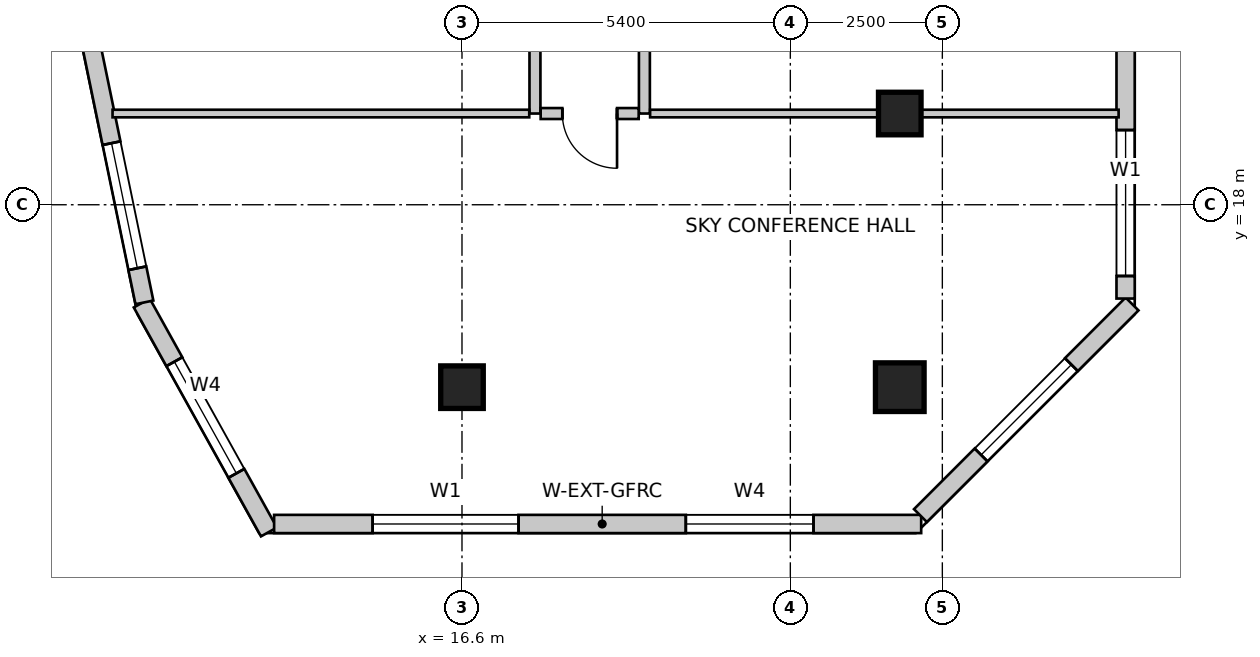
"""IFC4 building model, lengths in metres.
Left out: names, types, materials, properties, quantities, classifications, styles, units other than length and angle.
Written with IfcOpenShell. Run it as: python <this file> out.ifc"""

import sys

from ifc_helpers import new_model, si_unit, direction, frame, frame_2d, origin, origin_2d, place, context, subcontext, project, spatial, rectangle, extrude, source, transform, mapped, element, fill, save


model = new_model("IFC4")
c1 = context("Model", 3, precision=1e-05, world=origin(), true_north=direction((0.0, 1.0)))
c2 = subcontext(c1, "Body", "Model", "MODEL_VIEW")
j1 = project(units=[si_unit("LENGTHUNIT", "METRE"), si_unit("PLANEANGLEUNIT", "RADIAN")], contexts=[c1])
p1 = place(None, origin())
s1 = spatial("IfcSite", under=j1, at=p1, CompositionType="ELEMENT")
p2 = place(p1, origin())
s2 = spatial("IfcBuilding", under=s1, at=p2, CompositionType="ELEMENT")
p3 = place(p2, frame((0.0, 0.0, 235.9)))
s3 = spatial("IfcBuildingStorey", under=s2, at=p3, CompositionType="ELEMENT", Elevation=235.9)
m1 = source(origin(), c2, "Body", "SweptSolid", [
    extrude(rectangle(XDim=0.7, YDim=0.7, at=origin_2d()), origin(), (0.0, 0.0, 1.0), 3.5),
])
p4 = place(p3, frame((23.8, 19.5, 0.0), z_axis=(0.0, 0.0, 1.0), x_axis=(1.0, 0.0, 0.0)))
e1 = element("IfcColumn", 1, at=p4, inside=s3, PredefinedType="COLUMN", context=c2, shape_type="MappedRepresentation", body=[
    mapped(m1, transform((0.0, 0.0, 0.0), scale=1.0)),
])
m2 = source(origin(), c2, "Body", "SweptSolid", [
    extrude(rectangle(XDim=0.8, YDim=0.8, at=origin_2d()), origin(), (0.0, 0.0, 1.0), 3.5),
])
p5 = place(p3, frame((23.8, 15.0, 0.0), z_axis=(0.0, 0.0, 1.0), x_axis=(1.0, 0.0, 0.0)))
e2 = element("IfcColumn", 2, at=p5, inside=s3, PredefinedType="COLUMN", context=c2, shape_type="MappedRepresentation", body=[
    mapped(m2, transform((0.0, 0.0, 0.0), scale=1.0)),
])
p6 = place(p3, frame((16.6, 15.0, 0.0), z_axis=(0.0, 0.0, 1.0), x_axis=(1.0, 0.0, 0.0)))
e3 = element("IfcColumn", 3, at=p6, inside=s3, PredefinedType="COLUMN", context=c2, shape_type="MappedRepresentation", body=[
    mapped(m1, transform((0.0, 0.0, 0.0), scale=1.0)),
])
p7 = place(p3, frame((11.333, 16.384, 0.0), z_axis=(0.0, 0.0, 1.0), x_axis=(0.485633305139, -0.874162623852, 0.0)))
e4 = element("IfcWall", 4, at=p7, inside=s3, PredefinedType="SOLIDWALL", context=c2, shape_type="SweptSolid", body=[
    extrude(rectangle(XDim=4.307, YDim=0.3, at=frame_2d((2.153, 0.0))), origin(), (0.0, 0.0, 1.0), 3.25),
])
m3 = source(origin(), c2, "Body", "SweptSolid", [
    extrude(rectangle(XDim=2.1, YDim=2.0, at=frame_2d((1.05, 1.0))), frame((0.0, 0.16, 0.0), z_axis=(0.0, -1.0, 0.0), x_axis=(1.0, 0.0, 0.0)), (0.0, 0.0, 1.0), 0.32),
])
p8 = place(p7, frame((1.104, 0.0, 0.85)))
e5 = element("IfcOpeningElement", 5, at=p8, cuts=e4, PredefinedType="OPENING", context=c2, shape_type="MappedRepresentation", body=[
    mapped(m3, transform((0.0, 0.0, 0.0), scale=1.0)),
])
p9 = place(p3, frame((13.51, 12.75, 0.0), z_axis=(0.0, 0.0, 1.0), x_axis=(1.0, 0.0, 0.0)))
e6 = element("IfcWall", 6, at=p9, inside=s3, PredefinedType="SOLIDWALL", context=c2, shape_type="SweptSolid", body=[
    extrude(rectangle(XDim=10.642, YDim=0.3, at=frame_2d((5.321, 0.0))), origin(), (0.0, 0.0, 1.0), 3.25),
])
m4 = source(origin(), c2, "Body", "SweptSolid", [
    extrude(rectangle(XDim=2.4, YDim=2.2, at=frame_2d((1.2, 1.1))), frame((0.0, 0.16, 0.0), z_axis=(0.0, -1.0, 0.0), x_axis=(1.0, 0.0, 0.0)), (0.0, 0.0, 1.0), 0.32),
])
p10 = place(p9, frame((1.62, 0.0, 0.85)))
e7 = element("IfcOpeningElement", 7, at=p10, cuts=e6, PredefinedType="OPENING", context=c2, shape_type="MappedRepresentation", body=[
    mapped(m4, transform((0.0, 0.0, 0.0), scale=1.0)),
])
p11 = place(p9, frame((6.771, 0.0, 0.85)))
e8 = element("IfcOpeningElement", 8, at=p11, cuts=e6, PredefinedType="OPENING", context=c2, shape_type="MappedRepresentation", body=[
    mapped(m3, transform((0.0, 0.0, 0.0), scale=1.0)),
])
p12 = place(p3, frame((24.14, 12.888, 0.0), z_axis=(0.0, 0.0, 1.0), x_axis=(0.707106781187, 0.707106781187, 0.0)))
e9 = element("IfcWall", 9, at=p12, inside=s3, PredefinedType="SOLIDWALL", context=c2, shape_type="SweptSolid", body=[
    extrude(rectangle(XDim=4.922, YDim=0.3, at=frame_2d((2.461, 0.0))), origin(), (0.0, 0.0, 1.0), 3.25),
])
p13 = place(p12, frame((1.411, 0.0, 0.85)))
e10 = element("IfcOpeningElement", 10, at=p13, cuts=e9, PredefinedType="OPENING", context=c2, shape_type="MappedRepresentation", body=[
    mapped(m3, transform((0.0, 0.0, 0.0), scale=1.0)),
])
p14 = place(p3, frame((27.514, 16.457, 0.0), z_axis=(0.0, 0.0, 1.0), x_axis=(0.0, 1.0, 0.0)))
e11 = element("IfcWall", 11, at=p14, inside=s3, PredefinedType="SOLIDWALL", context=c2, shape_type="SweptSolid", body=[
    extrude(rectangle(XDim=14.447, YDim=0.3, at=frame_2d((7.223, 0.0))), origin(), (0.0, 0.0, 1.0), 3.25),
])
m5 = source(origin(), c2, "Body", "SweptSolid", [
    extrude(rectangle(XDim=1.6, YDim=2.15, at=frame_2d((0.8, 1.075))), frame((0.0, 0.16, 0.0), z_axis=(0.0, -1.0, 0.0), x_axis=(1.0, 0.0, 0.0)), (0.0, 0.0, 1.0), 0.32),
])
p15 = place(p14, frame((8.993, 0.0, 0.0)))
e12 = element("IfcOpeningElement", 12, at=p15, cuts=e11, PredefinedType="OPENING", context=c2, shape_type="MappedRepresentation", body=[
    mapped(m5, transform((0.0, 0.0, 0.0), scale=1.0)),
])
p16 = place(p14, frame((0.371, 0.0, 0.85)))
e13 = element("IfcOpeningElement", 13, at=p16, cuts=e11, PredefinedType="OPENING", context=c2, shape_type="MappedRepresentation", body=[
    mapped(m4, transform((0.0, 0.0, 0.0), scale=1.0)),
])
p17 = place(p14, frame((4.093, 0.0, 0.85)))
e14 = element("IfcOpeningElement", 14, at=p17, cuts=e11, PredefinedType="OPENING", context=c2, shape_type="MappedRepresentation", body=[
    mapped(m4, transform((0.0, 0.0, 0.0), scale=1.0)),
])
p18 = place(p14, frame((11.3, 0.0, 0.85)))
e15 = element("IfcOpeningElement", 15, at=p18, cuts=e11, PredefinedType="OPENING", context=c2, shape_type="MappedRepresentation", body=[
    mapped(m4, transform((0.0, 0.0, 0.0), scale=1.0)),
])
p19 = place(p3, frame((8.188, 31.834, 0.0), z_axis=(0.0, 0.0, 1.0), x_axis=(0.202303475707, -0.979322880217, 0.0)))
e16 = element("IfcWall", 16, at=p19, inside=s3, PredefinedType="SOLIDWALL", context=c2, shape_type="SweptSolid", body=[
    extrude(rectangle(XDim=15.766, YDim=0.3, at=frame_2d((7.883, 0.0))), origin(), (0.0, 0.0, 1.0), 3.25),
])
p20 = place(p19, frame((2.29, 0.0, 0.85)))
e17 = element("IfcOpeningElement", 17, at=p20, cuts=e16, PredefinedType="OPENING", context=c2, shape_type="MappedRepresentation", body=[
    mapped(m3, transform((0.0, 0.0, 0.0), scale=1.0)),
])
p21 = place(p19, frame((8.179, 0.0, 0.85)))
e18 = element("IfcOpeningElement", 18, at=p21, cuts=e16, PredefinedType="OPENING", context=c2, shape_type="MappedRepresentation", body=[
    mapped(m4, transform((0.0, 0.0, 0.0), scale=1.0)),
])
p22 = place(p19, frame((13.092, 0.0, 0.85)))
e19 = element("IfcOpeningElement", 19, at=p22, cuts=e16, PredefinedType="OPENING", context=c2, shape_type="MappedRepresentation", body=[
    mapped(m3, transform((0.0, 0.0, 0.0), scale=1.0)),
])
p23 = place(p3, frame((17.8, 19.5, 0.0), z_axis=(0.0, 0.0, 1.0), x_axis=(0.0, 1.0, 0.0)))
e20 = element("IfcWall", 20, at=p23, inside=s3, PredefinedType="PARTITIONING", context=c2, shape_type="SweptSolid", body=[
    extrude(rectangle(XDim=12.306, YDim=0.18, at=frame_2d((6.153, 0.0))), origin(), (0.0, 0.0, 1.0), 2.688),
])
m6 = source(origin(), c2, "Body", "SweptSolid", [
    extrude(rectangle(XDim=0.9, YDim=2.15, at=frame_2d((0.45, 1.075))), frame((0.0, 0.1, 0.0), z_axis=(0.0, -1.0, 0.0), x_axis=(1.0, 0.0, 0.0)), (0.0, 0.0, 1.0), 0.2),
])
p24 = place(p23, frame((5.703, 0.0, 0.0)))
e21 = element("IfcOpeningElement", 21, at=p24, cuts=e20, PredefinedType="OPENING", context=c2, shape_type="MappedRepresentation", body=[
    mapped(m6, transform((0.0, 0.0, 0.0), scale=1.0)),
])
p25 = place(p3, frame((19.6, 23.838, 0.0), z_axis=(0.0, 0.0, 1.0), x_axis=(0.0, -1.0, 0.0)))
e22 = element("IfcWall", 22, at=p25, inside=s3, PredefinedType="PARTITIONING", context=c2, shape_type="SweptSolid", body=[
    extrude(rectangle(XDim=4.338, YDim=0.18, at=frame_2d((2.169, 0.0))), origin(), (0.0, 0.0, 1.0), 2.688),
])
m7 = source(origin(), c2, "Body", "SweptSolid", [
    extrude(rectangle(XDim=0.85, YDim=2.15, at=frame_2d((0.425, 1.075))), frame((0.0, 0.1, 0.0), z_axis=(0.0, -1.0, 0.0), x_axis=(1.0, 0.0, 0.0)), (0.0, 0.0, 1.0), 0.2),
])
p26 = place(p25, frame((1.744, 0.0, 0.0)))
e23 = element("IfcOpeningElement", 23, at=p26, cuts=e22, PredefinedType="OPENING", context=c2, shape_type="MappedRepresentation", body=[
    mapped(m7, transform((0.0, 0.0, 0.0), scale=1.0)),
])
p27 = place(p3, frame((19.506, 19.5, 0.0), z_axis=(0.0, 0.0, 1.0), x_axis=(-1.0, 0.0, 0.0)))
e24 = element("IfcWall", 24, at=p27, inside=s3, PredefinedType="PARTITIONING", context=c2, shape_type="SweptSolid", body=[
    extrude(rectangle(XDim=1.612, YDim=0.18, at=frame_2d((0.806, 0.0))), origin(), (0.0, 0.0, 1.0), 3.25),
])
p28 = place(p27, frame((0.356, 0.0, 0.0)))
e25 = element("IfcOpeningElement", 25, at=p28, cuts=e24, PredefinedType="OPENING", context=c2, shape_type="MappedRepresentation", body=[
    mapped(m6, transform((0.0, 0.0, 0.0), scale=1.0)),
])
p29 = place(p3, frame((17.706, 19.5, 0.0), z_axis=(0.0, 0.0, 1.0), x_axis=(-1.0, 0.0, 0.0)))
e26 = element("IfcWall", 26, at=p29, inside=s3, PredefinedType="PARTITIONING", context=c2, shape_type="SweptSolid", body=[
    extrude(rectangle(XDim=6.853, YDim=0.125, at=frame_2d((3.427, 0.0))), origin(), (0.0, 0.0, 1.0), 3.25),
])
p30 = place(p3, frame((27.399, 19.5, 0.0), z_axis=(0.0, 0.0, 1.0), x_axis=(-1.0, 0.0, 0.0)))
e27 = element("IfcWall", 27, at=p30, inside=s3, PredefinedType="PARTITIONING", context=c2, shape_type="SweptSolid", body=[
    extrude(rectangle(XDim=7.705, YDim=0.125, at=frame_2d((3.853, 0.0))), origin(), (0.0, 0.0, 1.0), 2.542),
])
m8 = source(origin(), c2, "Body", "SweptSolid", [
    extrude(rectangle(XDim=2.1, YDim=2.0, at=frame_2d((1.05, 1.0))), frame((0.0, -0.015, 0.0), z_axis=(0.0, -1.0, 0.0), x_axis=(1.0, 0.0, 0.0)), (0.0, 0.0, 1.0), 0.06),
])
p31 = place(p8, origin())
e28 = element("IfcWindow", 28, at=p31, inside=s3, PartitioningType="SINGLE_PANEL", PredefinedType="WINDOW", context=c2, shape_type="MappedRepresentation", body=[
    mapped(m8, transform((0.0, 0.0, 0.0), scale=1.0)),
])
fill(e5, e28)
m9 = source(origin(), c2, "Body", "SweptSolid", [
    extrude(rectangle(XDim=2.4, YDim=2.2, at=frame_2d((1.2, 1.1))), frame((0.0, -0.015, 0.0), z_axis=(0.0, -1.0, 0.0), x_axis=(1.0, 0.0, 0.0)), (0.0, 0.0, 1.0), 0.06),
])
p32 = place(p10, origin())
e29 = element("IfcWindow", 29, at=p32, inside=s3, PartitioningType="SINGLE_PANEL", PredefinedType="WINDOW", context=c2, shape_type="MappedRepresentation", body=[
    mapped(m9, transform((0.0, 0.0, 0.0), scale=1.0)),
])
fill(e7, e29)
p33 = place(p11, origin())
e30 = element("IfcWindow", 30, at=p33, inside=s3, PartitioningType="SINGLE_PANEL", PredefinedType="WINDOW", context=c2, shape_type="MappedRepresentation", body=[
    mapped(m8, transform((0.0, 0.0, 0.0), scale=1.0)),
])
fill(e8, e30)
p34 = place(p13, origin())
e31 = element("IfcWindow", 31, at=p34, inside=s3, PartitioningType="SINGLE_PANEL", PredefinedType="WINDOW", context=c2, shape_type="MappedRepresentation", body=[
    mapped(m8, transform((0.0, 0.0, 0.0), scale=1.0)),
])
fill(e10, e31)
p35 = place(p16, origin())
e32 = element("IfcWindow", 32, at=p35, inside=s3, PartitioningType="SINGLE_PANEL", PredefinedType="WINDOW", context=c2, shape_type="MappedRepresentation", body=[
    mapped(m9, transform((0.0, 0.0, 0.0), scale=1.0)),
])
fill(e13, e32)
p36 = place(p22, origin())
e33 = element("IfcWindow", 33, at=p36, inside=s3, PartitioningType="SINGLE_PANEL", PredefinedType="WINDOW", context=c2, shape_type="MappedRepresentation", body=[
    mapped(m8, transform((0.0, 0.0, 0.0), scale=1.0)),
])
fill(e19, e33)
m10 = source(origin(), c2, "Body", "SweptSolid", [
    extrude(rectangle(XDim=0.9, YDim=2.15, at=frame_2d((0.45, 1.075))), frame((0.0, 0.025, 0.0), z_axis=(0.0, -1.0, 0.0), x_axis=(1.0, 0.0, 0.0)), (0.0, 0.0, 1.0), 0.05),
])
p37 = place(p28, origin())
e34 = element("IfcDoor", 34, at=p37, inside=s3, OperationType="SINGLE_SWING_LEFT", PredefinedType="DOOR", context=c2, shape_type="MappedRepresentation", body=[
    mapped(m10, transform((0.0, 0.0, 0.0), scale=1.0)),
])
fill(e25, e34)
save(model, sys.argv[1])
